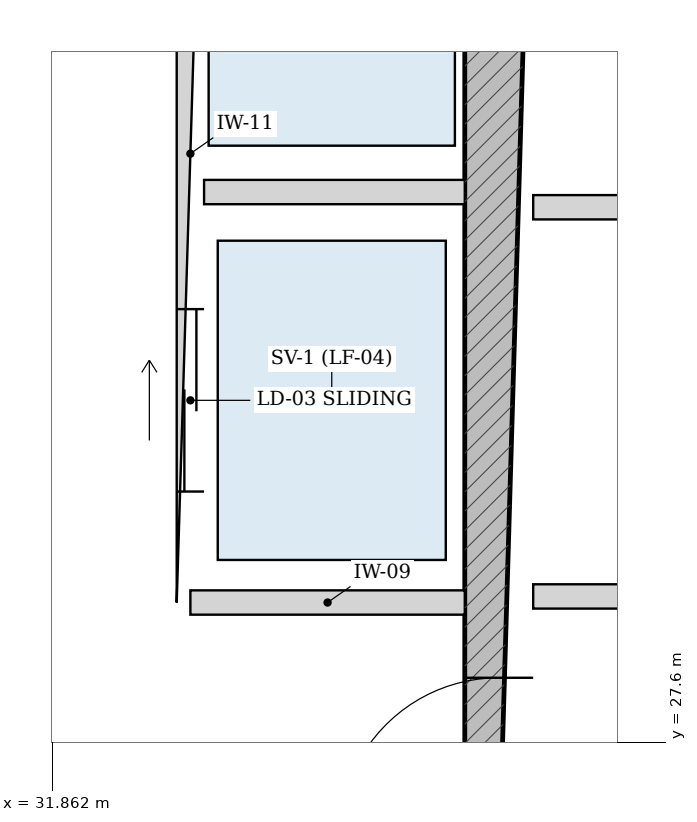
"""IFC4 building model, lengths in metres.
Left out: names, types, materials, properties, quantities, classifications, styles, units other than length and angle.
Written with IfcOpenShell. Run it as: python <this file> out.ifc"""

import sys

from ifc_helpers import new_model, si_unit, direction, frame, frame_2d, origin, place, context, subcontext, project, spatial, rectangle, extrude, source, transform, mapped, element, fill, save


model = new_model("IFC4")
c1 = context("Model", 3, precision=1e-05, world=origin(), true_north=direction((-0.2419218956, 0.970295726276)))
c2 = subcontext(c1, "Body", "Model", "MODEL_VIEW")
j1 = project(units=[si_unit("LENGTHUNIT", "METRE"), si_unit("PLANEANGLEUNIT", "RADIAN")], contexts=[c1])
p1 = place(None, origin())
s1 = spatial("IfcSite", under=j1, at=p1, CompositionType="ELEMENT")
p2 = place(p1, origin())
s2 = spatial("IfcBuilding", under=s1, at=p2, CompositionType="ELEMENT")
p3 = place(p2, frame((0.0, 0.0, 130.2)))
s3 = spatial("IfcBuildingStorey", under=s2, at=p3, CompositionType="ELEMENT", Elevation=130.2)
p4 = place(p3, frame((34.8, 19.175, 0.0), z_axis=(0.0, 0.0, 1.0), x_axis=(0.0, 1.0, 0.0)))
e1 = element("IfcWall", 1, at=p4, inside=s3, PredefinedType="SHEAR", context=c2, shape_type="SweptSolid", body=[
    extrude(rectangle(XDim=15.25, YDim=0.45, at=frame_2d((7.625, 0.0))), origin(), (0.0, 0.0, 1.0), 4.93),
])
p5 = place(p4, frame((7.8, 0.0, 0.0)))
e2 = element("IfcOpeningElement", 2, at=p5, cuts=e1, PredefinedType="OPENING", context=c2, shape_type="SweptSolid", body=[
    extrude(rectangle(XDim=1.05, YDim=2.15, at=frame_2d((0.525, 1.075))), frame((0.0, 0.235, 0.0), z_axis=(0.0, -1.0, 0.0), x_axis=(1.0, 0.0, 0.0)), (0.0, 0.0, 1.0), 0.47),
])
p6 = place(p3, frame((32.77, 28.52, 0.0), z_axis=(0.0, 0.0, 1.0), x_axis=(0.0, 1.0, 0.0)))
e3 = element("IfcWall", 3, at=p6, inside=s3, PredefinedType="PARTITIONING", context=c2, shape_type="SweptSolid", body=[
    extrude(rectangle(XDim=5.905, YDim=0.18, at=frame_2d((2.953, 0.0))), origin(), (0.0, 0.0, 1.0), 4.93),
])
p7 = place(p6, frame((3.655, 0.0, 0.0)))
e4 = element("IfcOpeningElement", 4, at=p7, cuts=e3, PredefinedType="OPENING", context=c2, shape_type="SweptSolid", body=[
    extrude(rectangle(XDim=1.15, YDim=2.2, at=frame_2d((0.575, 1.1))), frame((0.0, 0.1, 0.0), z_axis=(0.0, -1.0, 0.0), x_axis=(1.0, 0.0, 0.0)), (0.0, 0.0, 1.0), 0.2),
])
p8 = place(p6, frame((0.73, 0.0, 0.0)))
e5 = element("IfcOpeningElement", 5, at=p8, cuts=e3, PredefinedType="OPENING", context=c2, shape_type="SweptSolid", body=[
    extrude(rectangle(XDim=1.2, YDim=2.25, at=frame_2d((0.6, 1.125))), frame((0.0, 0.1, 0.0), z_axis=(0.0, -1.0, 0.0), x_axis=(1.0, 0.0, 0.0)), (0.0, 0.0, 1.0), 0.2),
])
p9 = place(p3, frame((32.86, 31.22, 0.0), z_axis=(0.0, 0.0, 1.0), x_axis=(1.0, 0.0, 0.0)))
e6 = element("IfcWall", 6, at=p9, inside=s3, PredefinedType="PARTITIONING", context=c2, shape_type="SweptSolid", body=[
    extrude(rectangle(XDim=1.715, YDim=0.16, at=frame_2d((0.857, 0.0))), origin(), (0.0, 0.0, 1.0), 4.93),
])
p10 = place(p3, frame((32.77, 28.52, 0.0), z_axis=(0.0, 0.0, 1.0), x_axis=(1.0, 0.0, 0.0)))
e7 = element("IfcWall", 7, at=p10, inside=s3, PredefinedType="PARTITIONING", context=c2, shape_type="SweptSolid", body=[
    extrude(rectangle(XDim=1.805, YDim=0.16, at=frame_2d((0.902, 0.0))), origin(), (0.0, 0.0, 1.0), 4.93),
])
p11 = place(p3, frame((35.025, 28.56, 0.0), z_axis=(0.0, 0.0, 1.0), x_axis=(1.0, 0.0, 0.0)))
e8 = element("IfcWall", 8, at=p11, inside=s3, PredefinedType="PARTITIONING", context=c2, shape_type="SweptSolid", body=[
    extrude(rectangle(XDim=5.95, YDim=0.16, at=frame_2d((2.975, 0.0))), origin(), (0.0, 0.0, 1.0), 4.93),
])
p12 = place(p11, frame((0.76, 0.0, 0.0)))
e9 = element("IfcOpeningElement", 9, at=p12, cuts=e8, PredefinedType="OPENING", context=c2, shape_type="SweptSolid", body=[
    extrude(rectangle(XDim=1.1, YDim=2.2, at=frame_2d((0.55, 1.1))), frame((0.0, 0.09, 0.0), z_axis=(0.0, -1.0, 0.0), x_axis=(1.0, 0.0, 0.0)), (0.0, 0.0, 1.0), 0.18),
])
p13 = place(p11, frame((2.425, 0.0, 0.0)))
e10 = element("IfcOpeningElement", 10, at=p13, cuts=e8, PredefinedType="OPENING", context=c2, shape_type="SweptSolid", body=[
    extrude(rectangle(XDim=1.1, YDim=2.2, at=frame_2d((0.55, 1.1))), frame((0.0, 0.09, 0.0), z_axis=(0.0, -1.0, 0.0), x_axis=(1.0, 0.0, 0.0)), (0.0, 0.0, 1.0), 0.18),
])
p14 = place(p11, frame((4.09, 0.0, 0.0)))
e11 = element("IfcOpeningElement", 11, at=p14, cuts=e8, PredefinedType="OPENING", context=c2, shape_type="SweptSolid", body=[
    extrude(rectangle(XDim=1.1, YDim=2.2, at=frame_2d((0.55, 1.1))), frame((0.0, 0.09, 0.0), z_axis=(0.0, -1.0, 0.0), x_axis=(1.0, 0.0, 0.0)), (0.0, 0.0, 1.0), 0.18),
])
p15 = place(p3, frame((35.025, 31.12, 0.0), z_axis=(0.0, 0.0, 1.0), x_axis=(1.0, 0.0, 0.0)))
e12 = element("IfcWall", 12, at=p15, inside=s3, PredefinedType="PARTITIONING", context=c2, shape_type="SweptSolid", body=[
    extrude(rectangle(XDim=5.95, YDim=0.16, at=frame_2d((2.975, 0.0))), origin(), (0.0, 0.0, 1.0), 4.93),
])
m1 = source(origin(), c2, "Body", "SweptSolid", [
    extrude(rectangle(XDim=1.05, YDim=2.15, at=frame_2d((0.525, 1.075))), frame((0.0, 0.025, 0.0), z_axis=(0.0, -1.0, 0.0), x_axis=(1.0, 0.0, 0.0)), (0.0, 0.0, 1.0), 0.05),
])
p16 = place(p5, origin())
e13 = element("IfcDoor", 13, at=p16, inside=s3, OperationType="SINGLE_SWING_LEFT", PredefinedType="DOOR", context=c2, shape_type="MappedRepresentation", body=[
    mapped(m1, transform((0.0, 0.0, 0.0), scale=1.0)),
])
fill(e2, e13)
m2 = source(origin(), c2, "Body", "SweptSolid", [
    extrude(rectangle(XDim=1.2, YDim=2.25, at=frame_2d((0.6, 1.125))), frame((0.0, 0.025, 0.0), z_axis=(0.0, -1.0, 0.0), x_axis=(1.0, 0.0, 0.0)), (0.0, 0.0, 1.0), 0.05),
])
p17 = place(p8, origin())
e14 = element("IfcDoor", 14, at=p17, inside=s3, OperationType="DOUBLE_DOOR_SLIDING", PredefinedType="DOOR", context=c2, shape_type="MappedRepresentation", body=[
    mapped(m2, transform((0.0, 0.0, 0.0), scale=1.0)),
])
fill(e5, e14)
save(model, sys.argv[1])
